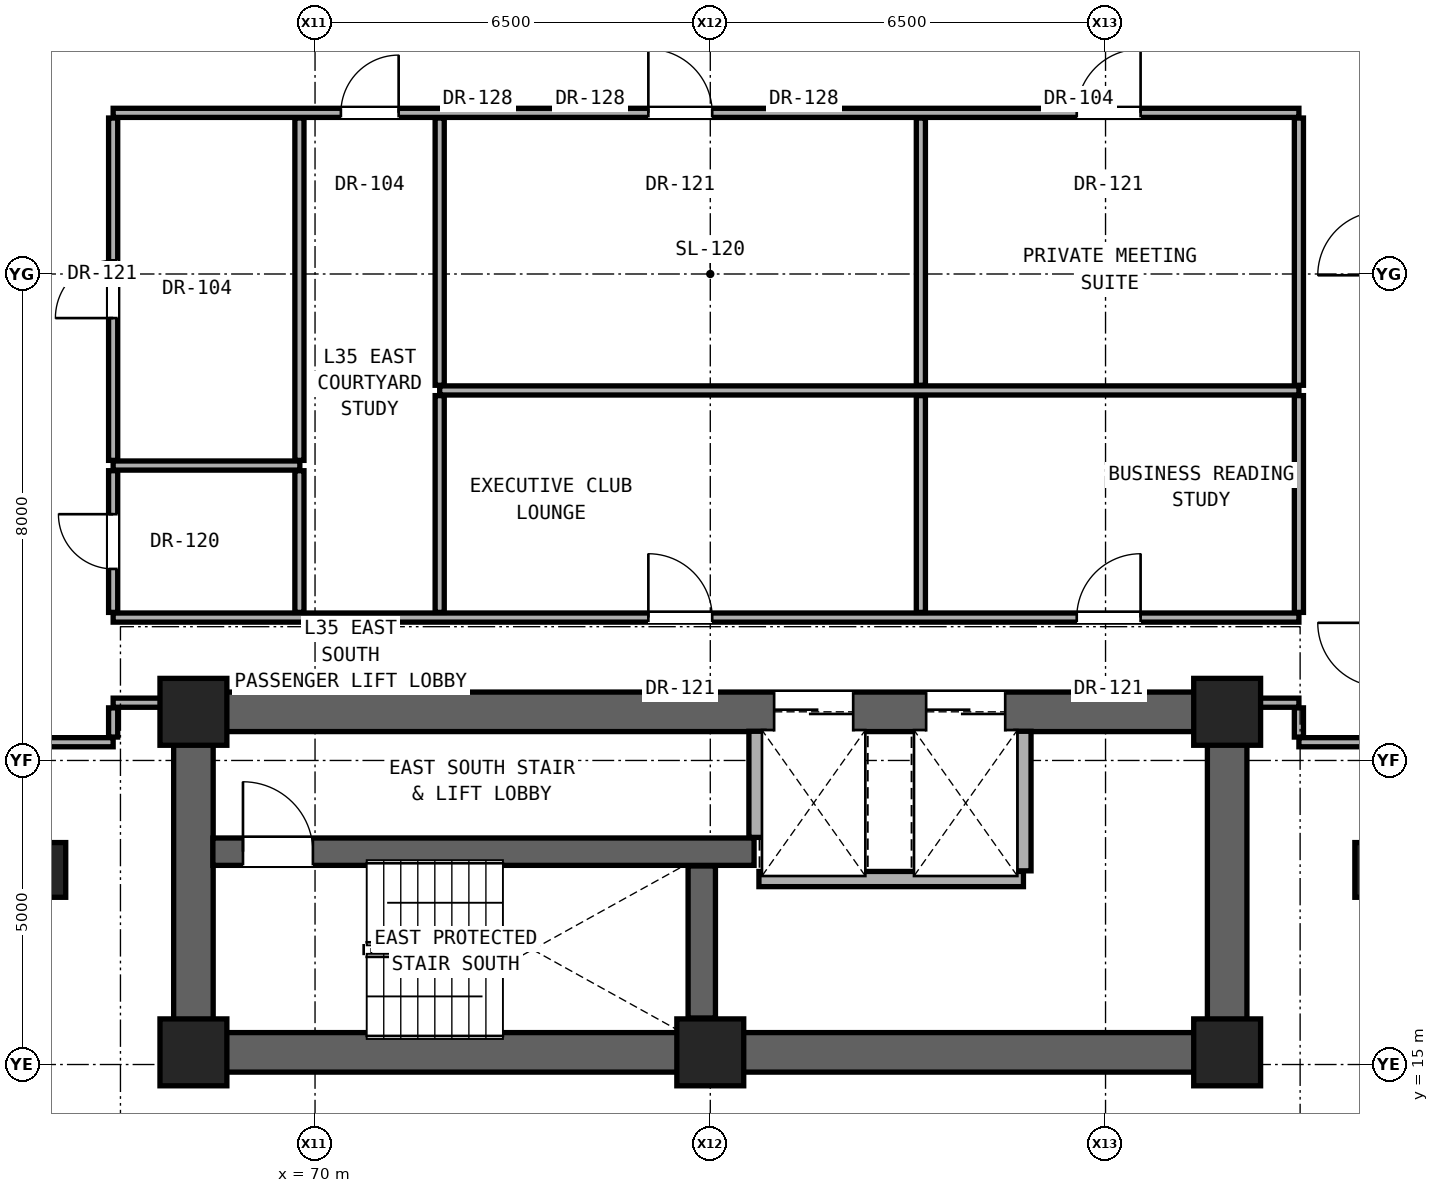
"""IFC4 building model, lengths in metres.
Left out: names, types, materials, properties, quantities, classifications, styles, units other than length and angle.
Written with IfcOpenShell. Run it as: python <this file> out.ifc"""

import sys

from ifc_helpers import new_model, si_unit, direction, frame, frame_2d, origin, origin_2d, place, context, subcontext, project, spatial, rectangle, extrude, element, fill, save


model = new_model("IFC4")
c1 = context("Model", 3, precision=1e-05, world=origin(), true_north=direction((0.0, 1.0)))
c2 = subcontext(c1, "Body", "Model", "MODEL_VIEW")
j1 = project(units=[si_unit("LENGTHUNIT", "METRE"), si_unit("PLANEANGLEUNIT", "RADIAN")], contexts=[c1])
p1 = place(None, origin())
s1 = spatial("IfcSite", under=j1, at=p1, CompositionType="ELEMENT")
p2 = place(p1, origin())
s2 = spatial("IfcBuilding", under=s1, at=p2, CompositionType="ELEMENT")
p3 = place(p2, frame((0.0, 0.0, 124.7)))
s3 = spatial("IfcBuildingStorey", under=s2, at=p3, CompositionType="ELEMENT", Elevation=124.7)
for number, where, z_axis, x_axis in (
    (1, (68.0, 15.2, 0.0), (0.0, 0.0, 1.0), (1.0, 0.0, 0.0)),
    (2, (76.5, 15.2, 0.0), (0.0, 0.0, 1.0), (1.0, 0.0, 0.0)),
    (3, (85.0, 15.2, 0.0), (0.0, 0.0, 1.0), (1.0, 0.0, 0.0)),
    (4, (68.0, 20.8, 0.0), (0.0, 0.0, 1.0), (1.0, 0.0, 0.0)),
    (5, (85.0, 20.8, 0.0), (0.0, 0.0, 1.0), (1.0, 0.0, 0.0)),
):
    element("IfcColumn", number, at=place(p3, frame(where, z_axis=z_axis, x_axis=x_axis)), inside=s3, PredefinedType="COLUMN", context=c2, shape_type="SweptSolid", body=[
        extrude(rectangle(XDim=1.1, YDim=1.1, at=origin_2d()), origin(), (0.0, 0.0, 1.0), 3.3),
    ])
for number, where, z_axis, x_axis in (
    (6, (65.6, 18.2, 0.0), (0.0, 0.0, 1.0), (1.0, 0.0, 0.0)),
    (7, (87.4, 18.2, 0.0), (0.0, 0.0, 1.0), (1.0, 0.0, 0.0)),
):
    element("IfcColumn", number, at=place(p3, frame(where, z_axis=z_axis, x_axis=x_axis)), inside=s3, PredefinedType="PILASTER", context=c2, shape_type="SweptSolid", body=[
        extrude(rectangle(XDim=0.6, YDim=0.9, at=origin_2d()), origin(), (0.0, 0.0, 1.0), 3.3),
    ])
p4 = place(p3, frame((68.0, 15.2, 0.0), z_axis=(0.0, 0.0, 1.0), x_axis=(1.0, 0.0, 0.0)))
e8 = element("IfcWall", 8, at=p4, inside=s3, PredefinedType="SHEAR", context=c2, shape_type="SweptSolid", body=[
    extrude(rectangle(XDim=17.0, YDim=0.65, at=frame_2d((8.5, 0.0))), origin(), (0.0, 0.0, 1.0), 3.08),
])
for number, where, z_axis, x_axis in (
    (9, (68.0, 15.2, 0.0), (0.0, 0.0, 1.0), (0.0, 1.0, 0.0)),
    (10, (85.0, 15.2, 0.0), (0.0, 0.0, 1.0), (0.0, 1.0, 0.0)),
):
    element("IfcWall", number, at=place(p3, frame(where, z_axis=z_axis, x_axis=x_axis)), inside=s3, PredefinedType="SHEAR", context=c2, shape_type="SweptSolid", body=[
        extrude(rectangle(XDim=5.6, YDim=0.65, at=frame_2d((2.8, 0.0))), origin(), (0.0, 0.0, 1.0), 3.08),
    ])
p5 = place(p3, frame((68.0, 20.8, 0.0), z_axis=(0.0, 0.0, 1.0), x_axis=(1.0, 0.0, 0.0)))
e11 = element("IfcWall", 11, at=p5, inside=s3, PredefinedType="SHEAR", context=c2, shape_type="SweptSolid", body=[
    extrude(rectangle(XDim=17.0, YDim=0.65, at=frame_2d((8.5, 0.0))), origin(), (0.0, 0.0, 1.0), 3.08),
])
p6 = place(p5, frame((9.55, 0.0, 0.0)))
e12 = element("IfcOpeningElement", 12, at=p6, cuts=e11, PredefinedType="OPENING", context=c2, shape_type="SweptSolid", body=[
    extrude(rectangle(XDim=1.3, YDim=2.3, at=frame_2d((0.65, 1.15))), frame((0.0, 0.335, 0.0), z_axis=(0.0, -1.0, 0.0), x_axis=(1.0, 0.0, 0.0)), (0.0, 0.0, 1.0), 0.67),
])
p7 = place(p5, frame((12.05, 0.0, 0.0)))
e13 = element("IfcOpeningElement", 13, at=p7, cuts=e11, PredefinedType="OPENING", context=c2, shape_type="SweptSolid", body=[
    extrude(rectangle(XDim=1.3, YDim=2.3, at=frame_2d((0.65, 1.15))), frame((0.0, 0.335, 0.0), z_axis=(0.0, -1.0, 0.0), x_axis=(1.0, 0.0, 0.0)), (0.0, 0.0, 1.0), 0.67),
])
p8 = place(p3, frame((77.3, 18.05, 0.0), z_axis=(0.0, 0.0, 1.0), x_axis=(1.0, 0.0, 0.0)))
e14 = element("IfcWall", 14, at=p8, inside=s3, PredefinedType="SOLIDWALL", context=c2, shape_type="SweptSolid", body=[
    extrude(rectangle(XDim=4.35, YDim=0.25, at=frame_2d((2.175, 0.0))), origin(), (0.0, 0.0, 1.0), 3.08),
])
p9 = place(p3, frame((68.32, 18.5, 0.0), z_axis=(0.0, 0.0, 1.0), x_axis=(1.0, 0.0, 0.0)))
e15 = element("IfcWall", 15, at=p9, inside=s3, PredefinedType="SHEAR", context=c2, shape_type="SweptSolid", body=[
    extrude(rectangle(XDim=8.9, YDim=0.45, at=frame_2d((4.45, 0.0))), origin(), (0.0, 0.0, 1.0), 3.08),
])
p10 = place(p9, frame((0.495, 0.0, 0.0)))
e16 = element("IfcOpeningElement", 16, at=p10, cuts=e15, PredefinedType="OPENING", context=c2, shape_type="SweptSolid", body=[
    extrude(rectangle(XDim=1.15, YDim=2.2, at=frame_2d((0.575, 1.1))), frame((0.0, 0.235, 0.0), z_axis=(0.0, -1.0, 0.0), x_axis=(1.0, 0.0, 0.0)), (0.0, 0.0, 1.0), 0.47),
])
p11 = place(p3, frame((65.32, 20.3, 0.0), z_axis=(0.0, 0.0, 1.0), x_axis=(1.0, 0.0, 0.0)))
e17 = element("IfcWall", 17, at=p11, inside=s3, PredefinedType="PARTITIONING", context=c2, shape_type="SweptSolid", body=[
    extrude(rectangle(XDim=1.36, YDim=0.15, at=frame_2d((0.68, 0.0))), origin(), (0.0, 0.0, 1.0), 3.08),
])
p12 = place(p3, frame((86.18, 20.3, 0.0), z_axis=(0.0, 0.0, 1.0), x_axis=(1.0, 0.0, 0.0)))
e18 = element("IfcWall", 18, at=p12, inside=s3, PredefinedType="PARTITIONING", context=c2, shape_type="SweptSolid", body=[
    extrude(rectangle(XDim=1.36, YDim=0.15, at=frame_2d((0.68, 0.0))), origin(), (0.0, 0.0, 1.0), 3.08),
])
p13 = place(p3, frame((66.68, 20.95, 0.0), z_axis=(0.0, 0.0, 1.0), x_axis=(1.0, 0.0, 0.0)))
e19 = element("IfcWall", 19, at=p13, inside=s3, PredefinedType="PARTITIONING", context=c2, shape_type="SweptSolid", body=[
    extrude(rectangle(XDim=1.0, YDim=0.15, at=frame_2d((0.5, 0.0))), origin(), (0.0, 0.0, 1.0), 2.472),
])
p14 = place(p3, frame((85.32, 20.95, 0.0), z_axis=(0.0, 0.0, 1.0), x_axis=(1.0, 0.0, 0.0)))
e20 = element("IfcWall", 20, at=p14, inside=s3, PredefinedType="PARTITIONING", context=c2, shape_type="SweptSolid", body=[
    extrude(rectangle(XDim=0.86, YDim=0.15, at=frame_2d((0.43, 0.0))), origin(), (0.0, 0.0, 1.0), 2.472),
])
p15 = place(p3, frame((66.68, 22.35, 0.0), z_axis=(0.0, 0.0, 1.0), x_axis=(1.0, 0.0, 0.0)))
e21 = element("IfcWall", 21, at=p15, inside=s3, PredefinedType="PARTITIONING", context=c2, shape_type="SweptSolid", body=[
    extrude(rectangle(XDim=19.5, YDim=0.15, at=frame_2d((9.75, 0.0))), origin(), (0.0, 0.0, 1.0), 2.216),
])
p16 = place(p15, frame((8.802, 0.0, 0.0)))
e22 = element("IfcOpeningElement", 22, at=p16, cuts=e21, PredefinedType="OPENING", context=c2, shape_type="SweptSolid", body=[
    extrude(rectangle(XDim=1.05, YDim=2.2, at=frame_2d((0.525, 1.1))), frame((0.0, 0.085, 0.0), z_axis=(0.0, -1.0, 0.0), x_axis=(1.0, 0.0, 0.0)), (0.0, 0.0, 1.0), 0.17),
])
p17 = place(p15, frame((15.846, 0.0, 0.0)))
e23 = element("IfcOpeningElement", 23, at=p17, cuts=e21, PredefinedType="OPENING", context=c2, shape_type="SweptSolid", body=[
    extrude(rectangle(XDim=1.05, YDim=2.2, at=frame_2d((0.525, 1.1))), frame((0.0, 0.085, 0.0), z_axis=(0.0, -1.0, 0.0), x_axis=(1.0, 0.0, 0.0)), (0.0, 0.0, 1.0), 0.17),
])
p18 = place(p3, frame((66.68, 24.85, 0.0), z_axis=(0.0, 0.0, 1.0), x_axis=(1.0, 0.0, 0.0)))
e24 = element("IfcWall", 24, at=p18, inside=s3, PredefinedType="PARTITIONING", context=c2, shape_type="SweptSolid", body=[
    extrude(rectangle(XDim=3.07, YDim=0.15, at=frame_2d((1.535, 0.0))), origin(), (0.0, 0.0, 1.0), 2.216),
])
p19 = place(p3, frame((72.05, 26.085, 0.0), z_axis=(0.0, 0.0, 1.0), x_axis=(1.0, 0.0, 0.0)))
e25 = element("IfcWall", 25, at=p19, inside=s3, PredefinedType="PARTITIONING", context=c2, shape_type="SweptSolid", body=[
    extrude(rectangle(XDim=14.13, YDim=0.15, at=frame_2d((7.065, 0.0))), origin(), (0.0, 0.0, 1.0), 2.216),
])
p20 = place(p3, frame((66.68, 30.65, 0.0), z_axis=(0.0, 0.0, 1.0), x_axis=(1.0, 0.0, 0.0)))
e26 = element("IfcWall", 26, at=p20, inside=s3, PredefinedType="PARTITIONING", context=c2, shape_type="SweptSolid", body=[
    extrude(rectangle(XDim=19.5, YDim=0.15, at=frame_2d((9.75, 0.0))), origin(), (0.0, 0.0, 1.0), 2.216),
])
p21 = place(p20, frame((3.745, 0.0, 0.0)))
e27 = element("IfcOpeningElement", 27, at=p21, cuts=e26, PredefinedType="OPENING", context=c2, shape_type="SweptSolid", body=[
    extrude(rectangle(XDim=0.95, YDim=2.15, at=frame_2d((0.475, 1.075))), frame((0.0, 0.085, 0.0), z_axis=(0.0, -1.0, 0.0), x_axis=(1.0, 0.0, 0.0)), (0.0, 0.0, 1.0), 0.17),
])
p22 = place(p20, frame((8.802, 0.0, 0.0)))
e28 = element("IfcOpeningElement", 28, at=p22, cuts=e26, PredefinedType="OPENING", context=c2, shape_type="SweptSolid", body=[
    extrude(rectangle(XDim=1.05, YDim=2.2, at=frame_2d((0.525, 1.1))), frame((0.0, 0.085, 0.0), z_axis=(0.0, -1.0, 0.0), x_axis=(1.0, 0.0, 0.0)), (0.0, 0.0, 1.0), 0.17),
])
p23 = place(p20, frame((15.846, 0.0, 0.0)))
e29 = element("IfcOpeningElement", 29, at=p23, cuts=e26, PredefinedType="OPENING", context=c2, shape_type="SweptSolid", body=[
    extrude(rectangle(XDim=1.05, YDim=2.2, at=frame_2d((0.525, 1.1))), frame((0.0, 0.085, 0.0), z_axis=(0.0, -1.0, 0.0), x_axis=(1.0, 0.0, 0.0)), (0.0, 0.0, 1.0), 0.17),
])
p24 = place(p3, frame((66.68, 20.385, 0.0), z_axis=(0.0, 0.0, 1.0), x_axis=(0.0, 1.0, 0.0)))
e30 = element("IfcWall", 30, at=p24, inside=s3, PredefinedType="PARTITIONING", context=c2, shape_type="SweptSolid", body=[
    extrude(rectangle(XDim=0.48, YDim=0.15, at=frame_2d((0.24, 0.0))), origin(), (0.0, 0.0, 1.0), 2.472),
])
p25 = place(p3, frame((66.68, 22.435, 0.0), z_axis=(0.0, 0.0, 1.0), x_axis=(0.0, 1.0, 0.0)))
e31 = element("IfcWall", 31, at=p25, inside=s3, PredefinedType="PARTITIONING", context=c2, shape_type="SweptSolid", body=[
    extrude(rectangle(XDim=2.33, YDim=0.15, at=frame_2d((1.165, 0.0))), origin(), (0.0, 0.0, 1.0), 3.08),
])
p26 = place(p25, frame((0.715, 0.0, 0.0)))
e32 = element("IfcOpeningElement", 32, at=p26, cuts=e31, PredefinedType="OPENING", context=c2, shape_type="SweptSolid", body=[
    extrude(rectangle(XDim=0.9, YDim=2.1, at=frame_2d((0.45, 1.05))), frame((0.0, 0.085, 0.0), z_axis=(0.0, -1.0, 0.0), x_axis=(1.0, 0.0, 0.0)), (0.0, 0.0, 1.0), 0.17),
])
p27 = place(p3, frame((66.68, 24.935, 0.0), z_axis=(0.0, 0.0, 1.0), x_axis=(0.0, 1.0, 0.0)))
e33 = element("IfcWall", 33, at=p27, inside=s3, PredefinedType="PARTITIONING", context=c2, shape_type="SweptSolid", body=[
    extrude(rectangle(XDim=5.63, YDim=0.15, at=frame_2d((2.815, 0.0))), origin(), (0.0, 0.0, 1.0), 2.376),
])
p28 = place(p27, frame((2.34, 0.0, 0.0)))
e34 = element("IfcOpeningElement", 34, at=p28, cuts=e33, PredefinedType="OPENING", context=c2, shape_type="SweptSolid", body=[
    extrude(rectangle(XDim=0.95, YDim=2.15, at=frame_2d((0.475, 1.075))), frame((0.0, 0.085, 0.0), z_axis=(0.0, -1.0, 0.0), x_axis=(1.0, 0.0, 0.0)), (0.0, 0.0, 1.0), 0.17),
])
p29 = place(p3, frame((69.743, 22.435, 0.0), z_axis=(0.0, 0.0, 1.0), x_axis=(0.0, 1.0, 0.0)))
e35 = element("IfcWall", 35, at=p29, inside=s3, PredefinedType="PARTITIONING", context=c2, shape_type="SweptSolid", body=[
    extrude(rectangle(XDim=2.33, YDim=0.15, at=frame_2d((1.165, 0.0))), origin(), (0.0, 0.0, 1.0), 3.08),
])
p30 = place(p3, frame((69.743, 24.935, 0.0), z_axis=(0.0, 0.0, 1.0), x_axis=(0.0, 1.0, 0.0)))
e36 = element("IfcWall", 36, at=p30, inside=s3, PredefinedType="PARTITIONING", context=c2, shape_type="SweptSolid", body=[
    extrude(rectangle(XDim=5.63, YDim=0.15, at=frame_2d((2.815, 0.0))), origin(), (0.0, 0.0, 1.0), 2.216),
])
p31 = place(p3, frame((72.05, 22.435, 0.0), z_axis=(0.0, 0.0, 1.0), x_axis=(0.0, 1.0, 0.0)))
e37 = element("IfcWall", 37, at=p31, inside=s3, PredefinedType="PARTITIONING", context=c2, shape_type="SweptSolid", body=[
    extrude(rectangle(XDim=3.565, YDim=0.15, at=frame_2d((1.782, 0.0))), origin(), (0.0, 0.0, 1.0), 3.08),
])
p32 = place(p3, frame((72.05, 26.17, 0.0), z_axis=(0.0, 0.0, 1.0), x_axis=(0.0, 1.0, 0.0)))
e38 = element("IfcWall", 38, at=p32, inside=s3, PredefinedType="PARTITIONING", context=c2, shape_type="SweptSolid", body=[
    extrude(rectangle(XDim=4.395, YDim=0.15, at=frame_2d((2.198, 0.0))), origin(), (0.0, 0.0, 1.0), 2.216),
])
p33 = place(p3, frame((76.36, 15.765, 0.0), z_axis=(0.0, 0.0, 1.0), x_axis=(0.0, 1.0, 0.0)))
e39 = element("IfcWall", 39, at=p33, inside=s3, PredefinedType="SHEAR", context=c2, shape_type="SweptSolid", body=[
    extrude(rectangle(XDim=2.5, YDim=0.45, at=frame_2d((1.25, 0.0))), origin(), (0.0, 0.0, 1.0), 3.08),
])
p34 = place(p3, frame((77.26, 18.735, 0.0), z_axis=(0.0, 0.0, 1.0), x_axis=(0.0, 1.0, 0.0)))
e40 = element("IfcWall", 40, at=p34, inside=s3, PredefinedType="SOLIDWALL", context=c2, shape_type="SweptSolid", body=[
    extrude(rectangle(XDim=1.745, YDim=0.25, at=frame_2d((0.873, 0.0))), origin(), (0.0, 0.0, 1.0), 3.08),
])
p35 = place(p3, frame((79.963, 22.435, 0.0), z_axis=(0.0, 0.0, 1.0), x_axis=(0.0, 1.0, 0.0)))
e41 = element("IfcWall", 41, at=p35, inside=s3, PredefinedType="PARTITIONING", context=c2, shape_type="SweptSolid", body=[
    extrude(rectangle(XDim=3.565, YDim=0.15, at=frame_2d((1.782, 0.0))), origin(), (0.0, 0.0, 1.0), 3.08),
])
p36 = place(p3, frame((79.963, 26.17, 0.0), z_axis=(0.0, 0.0, 1.0), x_axis=(0.0, 1.0, 0.0)))
e42 = element("IfcWall", 42, at=p36, inside=s3, PredefinedType="PARTITIONING", context=c2, shape_type="SweptSolid", body=[
    extrude(rectangle(XDim=4.395, YDim=0.15, at=frame_2d((2.198, 0.0))), origin(), (0.0, 0.0, 1.0), 2.216),
])
p37 = place(p3, frame((81.65, 18.185, 0.0), z_axis=(0.0, 0.0, 1.0), x_axis=(0.0, 1.0, 0.0)))
e43 = element("IfcWall", 43, at=p37, inside=s3, PredefinedType="SOLIDWALL", context=c2, shape_type="SweptSolid", body=[
    extrude(rectangle(XDim=2.295, YDim=0.25, at=frame_2d((1.147, 0.0))), origin(), (0.0, 0.0, 1.0), 3.08),
])
p38 = place(p3, frame((86.18, 20.385, 0.0), z_axis=(0.0, 0.0, 1.0), x_axis=(0.0, 1.0, 0.0)))
e44 = element("IfcWall", 44, at=p38, inside=s3, PredefinedType="PARTITIONING", context=c2, shape_type="SweptSolid", body=[
    extrude(rectangle(XDim=0.48, YDim=0.15, at=frame_2d((0.24, 0.0))), origin(), (0.0, 0.0, 1.0), 2.472),
])
p39 = place(p3, frame((86.18, 22.435, 0.0), z_axis=(0.0, 0.0, 1.0), x_axis=(0.0, 1.0, 0.0)))
e45 = element("IfcWall", 45, at=p39, inside=s3, PredefinedType="PARTITIONING", context=c2, shape_type="SweptSolid", body=[
    extrude(rectangle(XDim=3.565, YDim=0.15, at=frame_2d((1.782, 0.0))), origin(), (0.0, 0.0, 1.0), 3.08),
])
p40 = place(p3, frame((86.18, 26.17, 0.0), z_axis=(0.0, 0.0, 1.0), x_axis=(0.0, 1.0, 0.0)))
e46 = element("IfcWall", 46, at=p40, inside=s3, PredefinedType="PARTITIONING", context=c2, shape_type="SweptSolid", body=[
    extrude(rectangle(XDim=4.395, YDim=0.15, at=frame_2d((2.198, 0.0))), origin(), (0.0, 0.0, 1.0), 2.376),
])
p41 = place(p10, origin())
e47 = element("IfcDoor", 47, at=p41, inside=s3, OperationType="SINGLE_SWING_LEFT", PredefinedType="DOOR", context=c2, shape_type="SweptSolid", body=[
    extrude(rectangle(XDim=1.15, YDim=2.2, at=frame_2d((0.575, 1.1))), frame((0.0, 0.025, 0.0), z_axis=(0.0, -1.0, 0.0), x_axis=(1.0, 0.0, 0.0)), (0.0, 0.0, 1.0), 0.05),
])
fill(e16, e47)
p42 = place(p26, origin())
e48 = element("IfcDoor", 48, at=p42, inside=s3, OperationType="SINGLE_SWING_RIGHT", PredefinedType="DOOR", context=c2, shape_type="SweptSolid", body=[
    extrude(rectangle(XDim=0.9, YDim=2.1, at=frame_2d((0.45, 1.05))), frame((0.0, 0.025, 0.0), z_axis=(0.0, -1.0, 0.0), x_axis=(1.0, 0.0, 0.0)), (0.0, 0.0, 1.0), 0.05),
])
fill(e32, e48)
p43 = place(p28, origin())
e49 = element("IfcDoor", 49, at=p43, inside=s3, OperationType="SINGLE_SWING_LEFT", PredefinedType="DOOR", context=c2, shape_type="SweptSolid", body=[
    extrude(rectangle(XDim=0.95, YDim=2.15, at=frame_2d((0.475, 1.075))), frame((0.0, 0.025, 0.0), z_axis=(0.0, -1.0, 0.0), x_axis=(1.0, 0.0, 0.0)), (0.0, 0.0, 1.0), 0.05),
])
fill(e34, e49)
p44 = place(p21, origin())
e50 = element("IfcDoor", 50, at=p44, inside=s3, OperationType="SINGLE_SWING_RIGHT", PredefinedType="DOOR", context=c2, shape_type="SweptSolid", body=[
    extrude(rectangle(XDim=0.95, YDim=2.15, at=frame_2d((0.475, 1.075))), frame((0.0, 0.025, 0.0), z_axis=(0.0, -1.0, 0.0), x_axis=(1.0, 0.0, 0.0)), (0.0, 0.0, 1.0), 0.05),
])
fill(e27, e50)
p45 = place(p16, origin())
e51 = element("IfcDoor", 51, at=p45, inside=s3, OperationType="SINGLE_SWING_LEFT", PredefinedType="DOOR", context=c2, shape_type="SweptSolid", body=[
    extrude(rectangle(XDim=1.05, YDim=2.2, at=frame_2d((0.525, 1.1))), frame((0.0, 0.025, 0.0), z_axis=(0.0, -1.0, 0.0), x_axis=(1.0, 0.0, 0.0)), (0.0, 0.0, 1.0), 0.05),
])
fill(e22, e51)
p46 = place(p17, origin())
e52 = element("IfcDoor", 52, at=p46, inside=s3, OperationType="SINGLE_SWING_RIGHT", PredefinedType="DOOR", context=c2, shape_type="SweptSolid", body=[
    extrude(rectangle(XDim=1.05, YDim=2.2, at=frame_2d((0.525, 1.1))), frame((0.0, 0.025, 0.0), z_axis=(0.0, -1.0, 0.0), x_axis=(1.0, 0.0, 0.0)), (0.0, 0.0, 1.0), 0.05),
])
fill(e23, e52)
p47 = place(p22, origin())
e53 = element("IfcDoor", 53, at=p47, inside=s3, OperationType="SINGLE_SWING_LEFT", PredefinedType="DOOR", context=c2, shape_type="SweptSolid", body=[
    extrude(rectangle(XDim=1.05, YDim=2.2, at=frame_2d((0.525, 1.1))), frame((0.0, 0.025, 0.0), z_axis=(0.0, -1.0, 0.0), x_axis=(1.0, 0.0, 0.0)), (0.0, 0.0, 1.0), 0.05),
])
fill(e28, e53)
p48 = place(p23, origin())
e54 = element("IfcDoor", 54, at=p48, inside=s3, OperationType="SINGLE_SWING_RIGHT", PredefinedType="DOOR", context=c2, shape_type="SweptSolid", body=[
    extrude(rectangle(XDim=1.05, YDim=2.2, at=frame_2d((0.525, 1.1))), frame((0.0, 0.025, 0.0), z_axis=(0.0, -1.0, 0.0), x_axis=(1.0, 0.0, 0.0)), (0.0, 0.0, 1.0), 0.05),
])
fill(e29, e54)
p49 = place(p6, origin())
e55 = element("IfcDoor", 55, at=p49, inside=s3, OperationType="DOUBLE_DOOR_SLIDING", PredefinedType="DOOR", context=c2, shape_type="SweptSolid", body=[
    extrude(rectangle(XDim=1.3, YDim=2.3, at=frame_2d((0.65, 1.15))), frame((0.0, 0.025, 0.0), z_axis=(0.0, -1.0, 0.0), x_axis=(1.0, 0.0, 0.0)), (0.0, 0.0, 1.0), 0.05),
])
fill(e12, e55)
p50 = place(p7, origin())
e56 = element("IfcDoor", 56, at=p50, inside=s3, OperationType="DOUBLE_DOOR_SLIDING", PredefinedType="DOOR", context=c2, shape_type="SweptSolid", body=[
    extrude(rectangle(XDim=1.3, YDim=2.3, at=frame_2d((0.65, 1.15))), frame((0.0, 0.025, 0.0), z_axis=(0.0, -1.0, 0.0), x_axis=(1.0, 0.0, 0.0)), (0.0, 0.0, 1.0), 0.05),
])
fill(e13, e56)
save(model, sys.argv[1])
